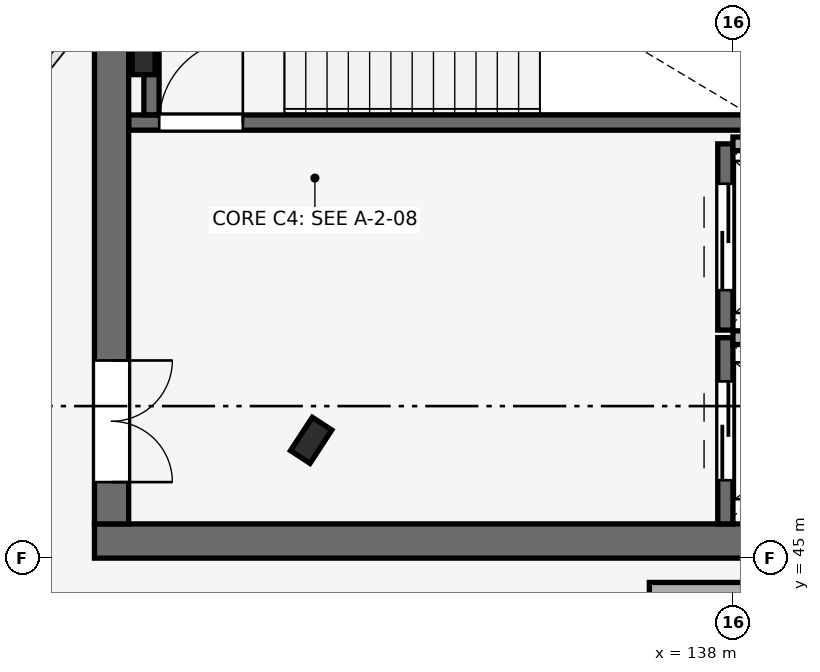
"""IFC4 building model, lengths in metres.
Left out: names, types, materials, properties, quantities, classifications, styles, units other than length and angle.
Written with IfcOpenShell. Run it as: python <this file> out.ifc"""

import sys

from ifc_helpers import new_model, si_unit, direction, frame, frame_2d, origin, origin_2d, place, context, subcontext, project, spatial, rectangle, i_section, extrude, element, fill, save


model = new_model("IFC4")
c1 = context("Model", 3, precision=1e-05, world=origin(), true_north=direction((0.0, 1.0)))
c2 = subcontext(c1, "Body", "Model", "MODEL_VIEW")
j1 = project(units=[si_unit("LENGTHUNIT", "METRE"), si_unit("PLANEANGLEUNIT", "RADIAN")], contexts=[c1])
p1 = place(None, origin())
s1 = spatial("IfcSite", under=j1, at=p1, CompositionType="ELEMENT")
p2 = place(p1, origin())
s2 = spatial("IfcBuilding", under=s1, at=p2, CompositionType="ELEMENT")
p3 = place(p2, frame((0.0, 0.0, 15.0)))
s3 = spatial("IfcBuildingStorey", under=s2, at=p3, CompositionType="ELEMENT", Elevation=15.0)
p4 = place(p3, frame((132.451, 46.55, 0.0), z_axis=(0.0, 0.0, 1.0), x_axis=(0.836955398099, -0.547271104292, 0.0)))
e1 = element("IfcColumn", 1, at=p4, inside=s3, PredefinedType="COLUMN", context=c2, shape_type="SweptSolid", body=[
    extrude(i_section(OverallWidth=0.306, OverallDepth=0.524, WebThickness=0.021, FlangeThickness=0.04, FilletRadius=0.027, at=origin_2d()), origin(), (0.0, 0.0, 1.0), 4.5),
])
p5 = place(p3, frame((129.6, 45.225, 0.0), z_axis=(0.0, 0.0, 1.0), x_axis=(1.0, 0.0, 0.0)))
e2 = element("IfcWall", 2, at=p5, inside=s3, PredefinedType="SHEAR", context=c2, shape_type="SweptSolid", body=[
    extrude(rectangle(XDim=11.4, YDim=0.45, at=frame_2d((5.7, 0.0))), origin(), (0.0, 0.0, 1.0), 4.5),
])
p6 = place(p3, frame((129.825, 45.45, 0.0), z_axis=(0.0, 0.0, 1.0), x_axis=(0.0, 1.0, 0.0)))
e3 = element("IfcWall", 3, at=p6, inside=s3, PredefinedType="SHEAR", context=c2, shape_type="SweptSolid", body=[
    extrude(rectangle(XDim=9.1, YDim=0.45, at=frame_2d((4.55, 0.0))), origin(), (0.0, 0.0, 1.0), 4.5),
])
p7 = place(p6, frame((0.55, 0.0, 0.0)))
e4 = element("IfcOpeningElement", 4, at=p7, cuts=e3, PredefinedType="OPENING", context=c2, shape_type="SweptSolid", body=[
    extrude(rectangle(XDim=1.6, YDim=2.2, at=frame_2d((0.8, 1.1))), frame((0.0, 0.235, 0.0), z_axis=(0.0, -1.0, 0.0), x_axis=(1.0, 0.0, 0.0)), (0.0, 0.0, 1.0), 0.47),
])
p8 = place(p3, frame((130.248, 51.611, 0.0), z_axis=(0.0, 0.0, 1.0), x_axis=(1.0, 0.0, 0.0)))
e5 = element("IfcColumn", 5, at=p8, inside=s3, PredefinedType="COLUMN", context=c2, shape_type="SweptSolid", body=[
    extrude(i_section(OverallWidth=0.3, OverallDepth=0.5, WebThickness=0.014, FlangeThickness=0.028, FilletRadius=0.027, at=origin_2d()), origin(), (0.0, 0.0, 1.0), 4.5),
])
p9 = place(p3, frame((142.5, 44.5, 0.0), z_axis=(0.0, 0.0, 1.0), x_axis=(-1.0, 0.0, 0.0)))
e6 = element("IfcWall", 6, at=p9, inside=s3, PredefinedType="STANDARD", context=c2, shape_type="SweptSolid", body=[
    extrude(rectangle(XDim=5.6, YDim=0.36, at=frame_2d((2.8, 0.0))), origin(), (0.0, 0.0, 1.0), 4.25),
])
p10 = place(p9, frame((1.3, 0.0, 0.85)))
e7 = element("IfcOpeningElement", 7, at=p10, cuts=e6, PredefinedType="OPENING", context=c2, shape_type="SweptSolid", body=[
    extrude(rectangle(XDim=3.0, YDim=2.1, at=frame_2d((1.5, 1.05))), frame((0.0, 0.19, 0.0), z_axis=(0.0, -1.0, 0.0), x_axis=(1.0, 0.0, 0.0)), (0.0, 0.0, 1.0), 0.38),
])
p11 = place(p3, frame((137.9, 45.45, 0.0), z_axis=(0.0, 0.0, 1.0), x_axis=(0.0, 1.0, 0.0)))
e8 = element("IfcWall", 8, at=p11, inside=s3, PredefinedType="SHEAR", context=c2, shape_type="SweptSolid", body=[
    extrude(rectangle(XDim=2.45, YDim=0.2, at=frame_2d((1.225, 0.0))), origin(), (0.0, 0.0, 1.0), 4.25),
])
p12 = place(p11, frame((0.575, 0.0, 0.0)))
e9 = element("IfcOpeningElement", 9, at=p12, cuts=e8, PredefinedType="OPENING", context=c2, shape_type="SweptSolid", body=[
    extrude(rectangle(XDim=1.3, YDim=2.2, at=frame_2d((0.65, 1.1))), frame((0.0, 0.11, 0.0), z_axis=(0.0, -1.0, 0.0), x_axis=(1.0, 0.0, 0.0)), (0.0, 0.0, 1.0), 0.22),
])
p13 = place(p3, frame((138.0, 47.9, 0.0), z_axis=(0.0, 0.0, 1.0), x_axis=(1.0, 0.0, 0.0)))
e10 = element("IfcWall", 10, at=p13, inside=s3, PredefinedType="PARTITIONING", context=c2, shape_type="SweptSolid", body=[
    extrude(rectangle(XDim=2.45, YDim=0.18, at=frame_2d((1.225, 0.0))), origin(), (0.0, 0.0, 1.0), 4.5),
])
p14 = place(p3, frame((137.9, 48.0, 0.0), z_axis=(0.0, 0.0, 1.0), x_axis=(0.0, 1.0, 0.0)))
e11 = element("IfcWall", 11, at=p14, inside=s3, PredefinedType="SHEAR", context=c2, shape_type="SweptSolid", body=[
    extrude(rectangle(XDim=2.45, YDim=0.2, at=frame_2d((1.225, 0.0))), origin(), (0.0, 0.0, 1.0), 4.25),
])
p15 = place(p14, frame((0.525, 0.0, 0.0)))
e12 = element("IfcOpeningElement", 12, at=p15, cuts=e11, PredefinedType="OPENING", context=c2, shape_type="SweptSolid", body=[
    extrude(rectangle(XDim=1.4, YDim=2.2, at=frame_2d((0.7, 1.1))), frame((0.0, 0.11, 0.0), z_axis=(0.0, -1.0, 0.0), x_axis=(1.0, 0.0, 0.0)), (0.0, 0.0, 1.0), 0.22),
])
p16 = place(p3, frame((138.0, 50.45, 0.0), z_axis=(0.0, 0.0, 1.0), x_axis=(1.0, 0.0, 0.0)))
e13 = element("IfcWall", 13, at=p16, inside=s3, PredefinedType="PARTITIONING", context=c2, shape_type="SweptSolid", body=[
    extrude(rectangle(XDim=2.45, YDim=0.18, at=frame_2d((1.225, 0.0))), origin(), (0.0, 0.0, 1.0), 4.5),
])
p17 = place(p3, frame((130.052, 50.73, 0.0), z_axis=(0.0, 0.0, 1.0), x_axis=(1.0, 0.0, 0.0)))
e14 = element("IfcWall", 14, at=p17, inside=s3, PredefinedType="SHEAR", context=c2, shape_type="SweptSolid", body=[
    extrude(rectangle(XDim=8.248, YDim=0.2, at=frame_2d((4.124, 0.0))), origin(), (0.0, 0.0, 1.0), 4.5),
])
p18 = place(p17, frame((0.4, 0.0, 0.0)))
e15 = element("IfcOpeningElement", 15, at=p18, cuts=e14, PredefinedType="OPENING", context=c2, shape_type="SweptSolid", body=[
    extrude(rectangle(XDim=1.1, YDim=2.15, at=frame_2d((0.55, 1.075))), frame((0.0, 0.11, 0.0), z_axis=(0.0, -1.0, 0.0), x_axis=(1.0, 0.0, 0.0)), (0.0, 0.0, 1.0), 0.22),
])
p19 = place(p3, frame((130.35, 50.832, 0.0), z_axis=(0.0, 0.0, 1.0), x_axis=(0.0, 1.0, 0.0)))
e16 = element("IfcWall", 16, at=p19, inside=s3, PredefinedType="SHEAR", context=c2, shape_type="SweptSolid", body=[
    extrude(rectangle(XDim=3.686, YDim=0.2, at=frame_2d((1.843, 0.0))), origin(), (0.0, 0.0, 1.0), 4.5),
])
p20 = place(p12, origin())
e17 = element("IfcDoor", 17, at=p20, inside=s3, OperationType="DOUBLE_DOOR_SLIDING", PredefinedType="DOOR", context=c2, shape_type="SweptSolid", body=[
    extrude(rectangle(XDim=1.3, YDim=2.2, at=frame_2d((0.65, 1.1))), frame((0.0, 0.025, 0.0), z_axis=(0.0, -1.0, 0.0), x_axis=(1.0, 0.0, 0.0)), (0.0, 0.0, 1.0), 0.05),
])
fill(e9, e17)
p21 = place(p15, origin())
e18 = element("IfcDoor", 18, at=p21, inside=s3, OperationType="DOUBLE_DOOR_SLIDING", PredefinedType="DOOR", context=c2, shape_type="SweptSolid", body=[
    extrude(rectangle(XDim=1.4, YDim=2.2, at=frame_2d((0.7, 1.1))), frame((0.0, 0.025, 0.0), z_axis=(0.0, -1.0, 0.0), x_axis=(1.0, 0.0, 0.0)), (0.0, 0.0, 1.0), 0.05),
])
fill(e12, e18)
p22 = place(p18, frame((1.1, 0.0, 0.0), z_axis=(0.0, 0.0, 1.0), x_axis=(-1.0, 0.0, 0.0)))
e19 = element("IfcDoor", 19, at=p22, inside=s3, OperationType="SINGLE_SWING_LEFT", PredefinedType="DOOR", context=c2, shape_type="SweptSolid", body=[
    extrude(rectangle(XDim=1.1, YDim=2.15, at=frame_2d((0.55, 1.075))), frame((0.0, 0.025, 0.0), z_axis=(0.0, -1.0, 0.0), x_axis=(1.0, 0.0, 0.0)), (0.0, 0.0, 1.0), 0.05),
])
fill(e15, e19)
p23 = place(p7, frame((1.6, 0.0, 0.0), z_axis=(0.0, 0.0, 1.0), x_axis=(-1.0, 0.0, 0.0)))
e20 = element("IfcDoor", 20, at=p23, inside=s3, OperationType="DOUBLE_DOOR_SINGLE_SWING", PredefinedType="DOOR", context=c2, shape_type="SweptSolid", body=[
    extrude(rectangle(XDim=1.6, YDim=2.2, at=frame_2d((0.8, 1.1))), frame((0.0, 0.025, 0.0), z_axis=(0.0, -1.0, 0.0), x_axis=(1.0, 0.0, 0.0)), (0.0, 0.0, 1.0), 0.05),
])
fill(e4, e20)
save(model, sys.argv[1])
